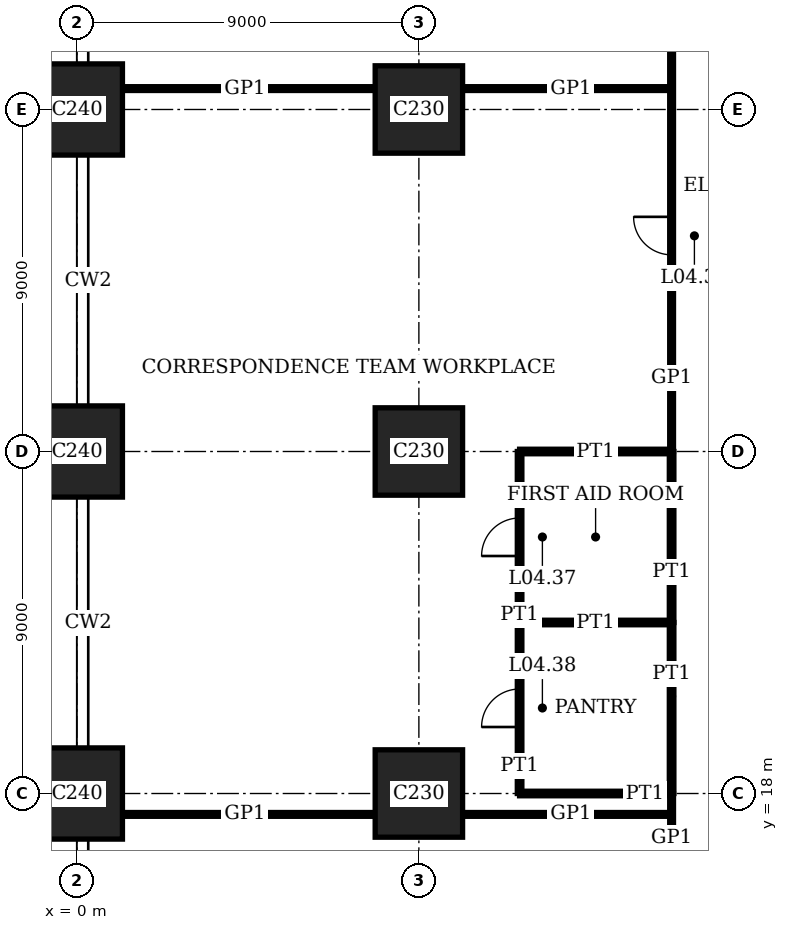
"""IFC4 building model, lengths in metres.
Left out: names, types, materials, properties, quantities, classifications, styles, units other than length and angle.
Written with IfcOpenShell. Run it as: python <this file> out.ifc"""

import sys

from ifc_helpers import new_model, si_unit, direction, frame, frame_2d, origin, origin_2d, place, context, subcontext, project, spatial, rectangle, extrude, element, fill, save


model = new_model("IFC4")
c1 = context("Model", 3, precision=1e-05, world=origin(), true_north=direction((0.0, 1.0)))
c2 = subcontext(c1, "Body", "Model", "MODEL_VIEW")
j1 = project(units=[si_unit("LENGTHUNIT", "METRE"), si_unit("PLANEANGLEUNIT", "RADIAN")], contexts=[c1])
p1 = place(None, origin())
s1 = spatial("IfcSite", under=j1, at=p1, CompositionType="ELEMENT")
p2 = place(p1, origin())
s2 = spatial("IfcBuilding", under=s1, at=p2, CompositionType="ELEMENT")
p3 = place(p2, frame((0.0, 0.0, 19.8)))
s3 = spatial("IfcBuildingStorey", under=s2, at=p3, CompositionType="ELEMENT", Elevation=19.8)
for number, where, z_axis, x_axis in (
    (1, (0.0, 18.0, 0.0), (0.0, 0.0, 1.0), (1.0, 0.0, 0.0)),
    (2, (0.0, 27.0, 0.0), (0.0, 0.0, 1.0), (1.0, 0.0, 0.0)),
    (3, (0.0, 36.0, 0.0), (0.0, 0.0, 1.0), (1.0, 0.0, 0.0)),
):
    element("IfcColumn", number, at=place(p3, frame(where, z_axis=z_axis, x_axis=x_axis)), inside=s3, PredefinedType="COLUMN", context=c2, shape_type="SweptSolid", body=[
        extrude(rectangle(XDim=2.4, YDim=2.4, at=origin_2d()), origin(), (0.0, 0.0, 1.0), 4.0),
    ])
for number, where, z_axis, x_axis in (
    (4, (9.0, 18.0, 0.0), (0.0, 0.0, 1.0), (1.0, 0.0, 0.0)),
    (5, (9.0, 27.0, 0.0), (0.0, 0.0, 1.0), (1.0, 0.0, 0.0)),
    (6, (9.0, 36.0, 0.0), (0.0, 0.0, 1.0), (1.0, 0.0, 0.0)),
):
    element("IfcColumn", number, at=place(p3, frame(where, z_axis=z_axis, x_axis=x_axis)), inside=s3, PredefinedType="COLUMN", context=c2, shape_type="SweptSolid", body=[
        extrude(rectangle(XDim=2.3, YDim=2.3, at=origin_2d()), origin(), (0.0, 0.0, 1.0), 4.0),
    ])
p4 = place(p3, frame((1.2, 17.45, 0.0), z_axis=(0.0, 0.0, 1.0), x_axis=(1.0, 0.0, 0.0)))
e7 = element("IfcWall", 7, at=p4, inside=s3, PredefinedType="PARTITIONING", context=c2, shape_type="SweptSolid", body=[
    extrude(rectangle(XDim=6.65, YDim=0.1, at=frame_2d((3.325, 0.0))), origin(), (0.0, 0.0, 1.0), 3.75),
])
p5 = place(p3, frame((10.15, 17.45, 0.0), z_axis=(0.0, 0.0, 1.0), x_axis=(1.0, 0.0, 0.0)))
e8 = element("IfcWall", 8, at=p5, inside=s3, PredefinedType="PARTITIONING", context=c2, shape_type="SweptSolid", body=[
    extrude(rectangle(XDim=5.5, YDim=0.1, at=frame_2d((2.75, 0.0))), origin(), (0.0, 0.0, 1.0), 3.75),
])
p6 = place(p3, frame((11.65, 18.0, 0.0), z_axis=(0.0, 0.0, 1.0), x_axis=(1.0, 0.0, 0.0)))
e9 = element("IfcWall", 9, at=p6, inside=s3, PredefinedType="PARTITIONING", context=c2, shape_type="SweptSolid", body=[
    extrude(rectangle(XDim=4.0, YDim=0.12, at=frame_2d((2.0, 0.0))), origin(), (0.0, 0.0, 1.0), 3.05),
])
p7 = place(p3, frame((11.65, 22.5, 0.0), z_axis=(0.0, 0.0, 1.0), x_axis=(1.0, 0.0, 0.0)))
e10 = element("IfcWall", 10, at=p7, inside=s3, PredefinedType="PARTITIONING", context=c2, shape_type="SweptSolid", body=[
    extrude(rectangle(XDim=4.0, YDim=0.12, at=frame_2d((2.0, 0.0))), origin(), (0.0, 0.0, 1.0), 3.1),
])
p8 = place(p3, frame((11.65, 27.0, 0.0), z_axis=(0.0, 0.0, 1.0), x_axis=(1.0, 0.0, 0.0)))
e11 = element("IfcWall", 11, at=p8, inside=s3, PredefinedType="PARTITIONING", context=c2, shape_type="SweptSolid", body=[
    extrude(rectangle(XDim=4.0, YDim=0.12, at=frame_2d((2.0, 0.0))), origin(), (0.0, 0.0, 1.0), 3.05),
])
p9 = place(p3, frame((1.2, 36.55, 0.0), z_axis=(0.0, 0.0, 1.0), x_axis=(1.0, 0.0, 0.0)))
e12 = element("IfcWall", 12, at=p9, inside=s3, PredefinedType="PARTITIONING", context=c2, shape_type="SweptSolid", body=[
    extrude(rectangle(XDim=6.65, YDim=0.1, at=frame_2d((3.325, 0.0))), origin(), (0.0, 0.0, 1.0), 3.75),
])
p10 = place(p3, frame((10.15, 36.55, 0.0), z_axis=(0.0, 0.0, 1.0), x_axis=(1.0, 0.0, 0.0)))
e13 = element("IfcWall", 13, at=p10, inside=s3, PredefinedType="PARTITIONING", context=c2, shape_type="SweptSolid", body=[
    extrude(rectangle(XDim=5.5, YDim=0.1, at=frame_2d((2.75, 0.0))), origin(), (0.0, 0.0, 1.0), 3.75),
])
p11 = place(p3, frame((11.65, 22.5, 0.0), z_axis=(0.0, 0.0, 1.0), x_axis=(0.0, 1.0, 0.0)))
e14 = element("IfcWall", 14, at=p11, inside=s3, PredefinedType="PARTITIONING", context=c2, shape_type="SweptSolid", body=[
    extrude(rectangle(XDim=4.5, YDim=0.12, at=frame_2d((2.25, 0.0))), origin(), (0.0, 0.0, 1.0), 3.75),
])
p12 = place(p11, frame((1.75, 0.0, 0.0)))
e15 = element("IfcOpeningElement", 15, at=p12, cuts=e14, PredefinedType="OPENING", context=c2, shape_type="SweptSolid", body=[
    extrude(rectangle(XDim=1.0, YDim=2.4, at=frame_2d((0.5, 1.2))), frame((0.0, 0.07, 0.0), z_axis=(0.0, -1.0, 0.0), x_axis=(1.0, 0.0, 0.0)), (0.0, 0.0, 1.0), 0.14),
])
p13 = place(p3, frame((11.65, 18.0, 0.0), z_axis=(0.0, 0.0, 1.0), x_axis=(0.0, 1.0, 0.0)))
e16 = element("IfcWall", 16, at=p13, inside=s3, PredefinedType="PARTITIONING", context=c2, shape_type="SweptSolid", body=[
    extrude(rectangle(XDim=4.5, YDim=0.12, at=frame_2d((2.25, 0.0))), origin(), (0.0, 0.0, 1.0), 3.75),
])
p14 = place(p13, frame((1.75, 0.0, 0.0)))
e17 = element("IfcOpeningElement", 17, at=p14, cuts=e16, PredefinedType="OPENING", context=c2, shape_type="SweptSolid", body=[
    extrude(rectangle(XDim=1.0, YDim=2.4, at=frame_2d((0.5, 1.2))), frame((0.0, 0.07, 0.0), z_axis=(0.0, -1.0, 0.0), x_axis=(1.0, 0.0, 0.0)), (0.0, 0.0, 1.0), 0.14),
])
for number, where, z_axis, x_axis in (
    (18, (15.65, 22.5, 0.0), (0.0, 0.0, 1.0), (0.0, 1.0, 0.0)),
    (19, (15.65, 18.0, 0.0), (0.0, 0.0, 1.0), (0.0, 1.0, 0.0)),
):
    element("IfcWall", number, at=place(p3, frame(where, z_axis=z_axis, x_axis=x_axis)), inside=s3, PredefinedType="PARTITIONING", context=c2, shape_type="SweptSolid", body=[
        extrude(rectangle(XDim=4.5, YDim=0.12, at=frame_2d((2.25, 0.0))), origin(), (0.0, 0.0, 1.0), 3.75),
    ])
p15 = place(p3, frame((15.65, 15.65, 0.0), z_axis=(0.0, 0.0, 1.0), x_axis=(0.0, 1.0, 0.0)))
e20 = element("IfcWall", 20, at=p15, inside=s3, PredefinedType="PARTITIONING", context=c2, shape_type="SweptSolid", body=[
    extrude(rectangle(XDim=2.35, YDim=0.1, at=frame_2d((1.175, 0.0))), origin(), (0.0, 0.0, 1.0), 3.75),
])
p16 = place(p3, frame((15.65, 27.0, 0.0), z_axis=(0.0, 0.0, 1.0), x_axis=(0.0, 1.0, 0.0)))
e21 = element("IfcWall", 21, at=p16, inside=s3, PredefinedType="PARTITIONING", context=c2, shape_type="SweptSolid", body=[
    extrude(rectangle(XDim=11.35, YDim=0.1, at=frame_2d((5.675, 0.0))), origin(), (0.0, 0.0, 1.0), 3.75),
])
p17 = place(p16, frame((5.175, 0.0, 0.0)))
e22 = element("IfcOpeningElement", 22, at=p17, cuts=e21, PredefinedType="OPENING", context=c2, shape_type="SweptSolid", body=[
    extrude(rectangle(XDim=1.0, YDim=2.4, at=frame_2d((0.5, 1.2))), frame((0.0, 0.06, 0.0), z_axis=(0.0, -1.0, 0.0), x_axis=(1.0, 0.0, 0.0)), (0.0, 0.0, 1.0), 0.12),
])
p18 = place(p12, origin())
e23 = element("IfcDoor", 23, at=p18, inside=s3, OperationType="SINGLE_SWING_RIGHT", PredefinedType="DOOR", context=c2, shape_type="SweptSolid", body=[
    extrude(rectangle(XDim=1.0, YDim=2.4, at=frame_2d((0.5, 1.2))), frame((0.0, 0.025, 0.0), z_axis=(0.0, -1.0, 0.0), x_axis=(1.0, 0.0, 0.0)), (0.0, 0.0, 1.0), 0.05),
])
fill(e15, e23)
p19 = place(p14, origin())
e24 = element("IfcDoor", 24, at=p19, inside=s3, OperationType="SINGLE_SWING_RIGHT", PredefinedType="DOOR", context=c2, shape_type="SweptSolid", body=[
    extrude(rectangle(XDim=1.0, YDim=2.4, at=frame_2d((0.5, 1.2))), frame((0.0, 0.025, 0.0), z_axis=(0.0, -1.0, 0.0), x_axis=(1.0, 0.0, 0.0)), (0.0, 0.0, 1.0), 0.05),
])
fill(e17, e24)
p20 = place(p17, origin())
e25 = element("IfcDoor", 25, at=p20, inside=s3, OperationType="SINGLE_SWING_LEFT", PredefinedType="DOOR", context=c2, shape_type="SweptSolid", body=[
    extrude(rectangle(XDim=1.0, YDim=2.4, at=frame_2d((0.5, 1.2))), frame((0.0, 0.02, 0.0), z_axis=(0.0, -1.0, 0.0), x_axis=(1.0, 0.0, 0.0)), (0.0, 0.0, 1.0), 0.04),
])
fill(e22, e25)
save(model, sys.argv[1])
